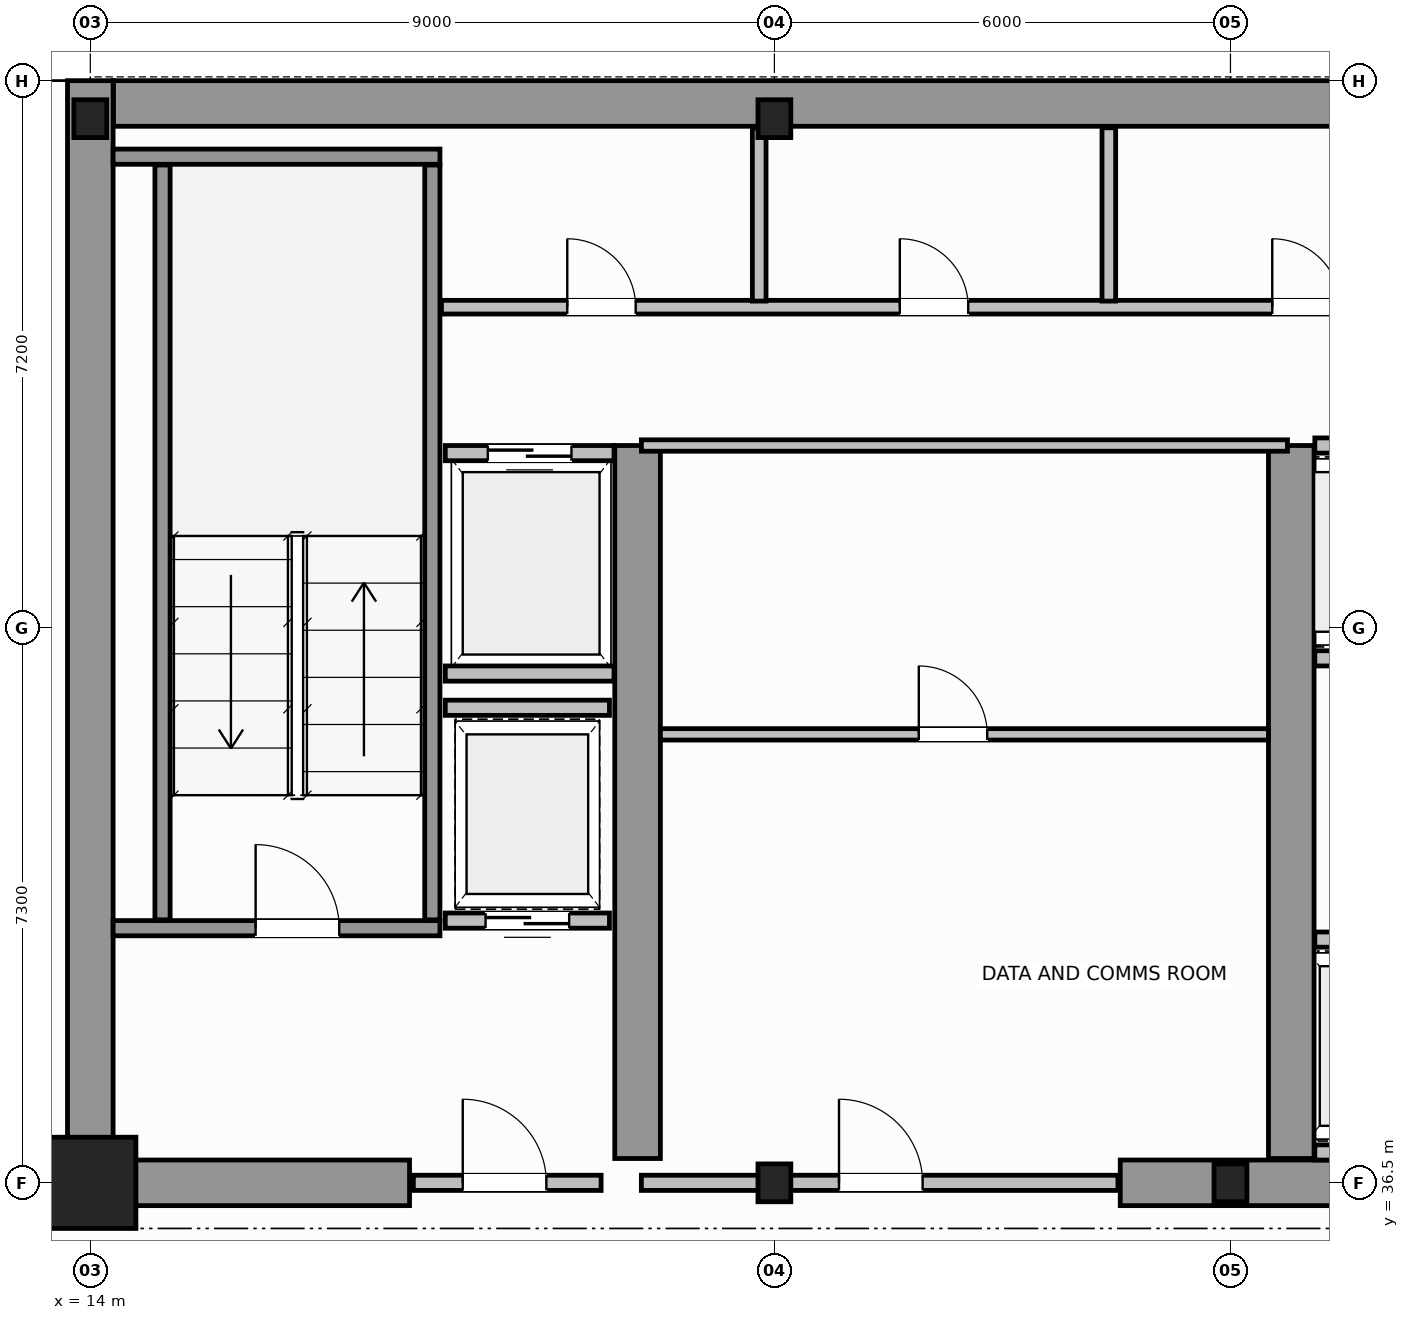
"""IFC4 building model, lengths in metres.
Left out: names, types, materials, properties, quantities, classifications, styles, units other than length and angle.
Written with IfcOpenShell. Run it as: python <this file> out.ifc"""

import sys

from ifc_helpers import new_model, si_unit, direction, frame, frame_2d, origin, origin_2d, place, context, subcontext, project, spatial, rectangle, i_section, extrude, source, transform, mapped, element, fill, save


model = new_model("IFC4")
c1 = context("Model", 3, precision=1e-05, world=origin(), true_north=direction((0.0, 1.0)))
c2 = subcontext(c1, "Body", "Model", "MODEL_VIEW")
j1 = project(units=[si_unit("LENGTHUNIT", "METRE"), si_unit("PLANEANGLEUNIT", "RADIAN")], contexts=[c1])
p1 = place(None, origin())
s1 = spatial("IfcSite", under=j1, at=p1, CompositionType="ELEMENT")
p2 = place(p1, origin())
s2 = spatial("IfcBuilding", under=s1, at=p2, CompositionType="ELEMENT")
p3 = place(p2, frame((0.0, 0.0, 172.8)))
s3 = spatial("IfcBuildingStorey", under=s2, at=p3, CompositionType="ELEMENT", Elevation=172.8)
m1 = source(origin(), c2, "Body", "SweptSolid", [
    extrude(rectangle(XDim=1.2, YDim=1.2, at=origin_2d()), origin(), (0.0, 0.0, 1.0), 3.8),
])
p4 = place(p3, frame((14.0, 36.5, 0.0), z_axis=(0.0, 0.0, 1.0), x_axis=(1.0, 0.0, 0.0)))
e1 = element("IfcColumn", 1, at=p4, inside=s3, PredefinedType="COLUMN", context=c2, shape_type="MappedRepresentation", body=[
    mapped(m1, transform((0.0, 0.0, 0.0), scale=1.0)),
])
m2 = source(origin(), c2, "Body", "SweptSolid", [
    extrude(i_section(OverallWidth=0.432, OverallDepth=0.498, WebThickness=0.055, FlangeThickness=0.068, FilletRadius=0.015, at=origin_2d()), origin(), (0.0, 0.0, 1.0), 3.8),
])
for number, where, z_axis, x_axis in (
    (2, (23.0, 36.5, 0.0), (0.0, 0.0, 1.0), (1.0, 0.0, 0.0)),
    (3, (29.0, 36.5, 0.0), (0.0, 0.0, 1.0), (1.0, 0.0, 0.0)),
    (4, (14.0, 50.5, 0.0), (0.0, 0.0, 1.0), (1.0, 0.0, 0.0)),
    (5, (23.0, 50.5, 0.0), (0.0, 0.0, 1.0), (1.0, 0.0, 0.0)),
):
    element("IfcColumn", number, at=place(p3, frame(where, z_axis=z_axis, x_axis=x_axis)), inside=s3, PredefinedType="COLUMN", context=c2, shape_type="MappedRepresentation", body=[
        mapped(m2, transform((0.0, 0.0, 0.0), scale=1.0)),
    ])
p5 = place(p3, frame((14.304, 50.7, 0.0), z_axis=(0.0, 0.0, 1.0), x_axis=(1.0, 0.0, 0.0)))
e6 = element("IfcWall", 6, at=p5, inside=s3, PredefinedType="SHEAR", context=c2, shape_type="SweptSolid", body=[
    extrude(rectangle(XDim=19.694, YDim=0.6, at=frame_2d((9.847, 0.0))), origin(), (0.0, 0.0, 1.0), 3.8),
])
p6 = place(p3, frame((14.0, 36.5, 0.0), z_axis=(0.0, 0.0, 1.0), x_axis=(0.0, 1.0, 0.0)))
e7 = element("IfcWall", 7, at=p6, inside=s3, PredefinedType="SHEAR", context=c2, shape_type="SweptSolid", body=[
    extrude(rectangle(XDim=14.5, YDim=0.6, at=frame_2d((7.25, 0.0))), origin(), (0.0, 0.0, 1.0), 3.8),
])
p7 = place(p3, frame((14.32, 36.5, 0.0), z_axis=(0.0, 0.0, 1.0), x_axis=(1.0, 0.0, 0.0)))
e8 = element("IfcWall", 8, at=p7, inside=s3, PredefinedType="SHEAR", context=c2, shape_type="SweptSolid", body=[
    extrude(rectangle(XDim=3.88, YDim=0.6, at=frame_2d((1.94, 0.0))), origin(), (0.0, 0.0, 1.0), 2.58),
])
p8 = place(p3, frame((27.55, 36.5, 0.0), z_axis=(0.0, 0.0, 1.0), x_axis=(1.0, 0.0, 0.0)))
e9 = element("IfcWall", 9, at=p8, inside=s3, PredefinedType="SHEAR", context=c2, shape_type="SweptSolid", body=[
    extrude(rectangle(XDim=4.5, YDim=0.6, at=frame_2d((2.25, 0.0))), origin(), (0.0, 0.0, 1.0), 3.8),
])
for number, where, z_axis, x_axis in (
    (10, (21.2, 36.82, 0.0), (0.0, 0.0, 1.0), (0.0, 1.0, 0.0)),
    (11, (29.8, 36.82, 0.0), (0.0, 0.0, 1.0), (0.0, 1.0, 0.0)),
):
    element("IfcWall", number, at=place(p3, frame(where, z_axis=z_axis, x_axis=x_axis)), inside=s3, PredefinedType="SHEAR", context=c2, shape_type="SweptSolid", body=[
        extrude(rectangle(XDim=9.38, YDim=0.6, at=frame_2d((4.69, 0.0))), origin(), (0.0, 0.0, 1.0), 3.8),
    ])
p9 = place(p3, frame((14.3, 39.85, 0.0), z_axis=(0.0, 0.0, 1.0), x_axis=(1.0, 0.0, 0.0)))
e12 = element("IfcWall", 12, at=p9, inside=s3, PredefinedType="SOLIDWALL", context=c2, shape_type="SweptSolid", body=[
    extrude(rectangle(XDim=4.3, YDim=0.2, at=frame_2d((2.15, 0.0))), origin(), (0.0, 0.0, 1.0), 3.8),
])
p10 = place(p9, frame((1.875, 0.0, 0.0)))
e13 = element("IfcOpeningElement", 13, at=p10, cuts=e12, PredefinedType="OPENING", context=c2, shape_type="SweptSolid", body=[
    extrude(rectangle(XDim=1.1, YDim=2.15, at=frame_2d((0.55, 1.075))), frame((0.0, 0.11, 0.0), z_axis=(0.0, -1.0, 0.0), x_axis=(1.0, 0.0, 0.0)), (0.0, 0.0, 1.0), 0.22),
])
p11 = place(p3, frame((14.3, 50.0, 0.0), z_axis=(0.0, 0.0, 1.0), x_axis=(1.0, 0.0, 0.0)))
e14 = element("IfcWall", 14, at=p11, inside=s3, PredefinedType="SOLIDWALL", context=c2, shape_type="SweptSolid", body=[
    extrude(rectangle(XDim=4.3, YDim=0.2, at=frame_2d((2.15, 0.0))), origin(), (0.0, 0.0, 1.0), 3.8),
])
for number, where, z_axis, x_axis in (
    (15, (14.95, 39.96, 0.0), (0.0, 0.0, 1.0), (0.0, 1.0, 0.0)),
    (16, (18.5, 39.96, 0.0), (0.0, 0.0, 1.0), (0.0, 1.0, 0.0)),
):
    element("IfcWall", number, at=place(p3, frame(where, z_axis=z_axis, x_axis=x_axis)), inside=s3, PredefinedType="SOLIDWALL", context=c2, shape_type="SweptSolid", body=[
        extrude(rectangle(XDim=9.93, YDim=0.2, at=frame_2d((4.965, 0.0))), origin(), (0.0, 0.0, 1.0), 3.8),
    ])
p12 = place(p3, frame((18.25, 36.5, 0.0), z_axis=(0.0, 0.0, 1.0), x_axis=(1.0, 0.0, 0.0)))
e17 = element("IfcWall", 17, at=p12, inside=s3, PredefinedType="SOLIDWALL", context=c2, shape_type="SweptSolid", body=[
    extrude(rectangle(XDim=2.47, YDim=0.2, at=frame_2d((1.235, 0.0))), origin(), (0.0, 0.0, 1.0), 2.57),
])
p13 = place(p12, frame((0.65, 0.0, 0.0)))
e18 = element("IfcOpeningElement", 18, at=p13, cuts=e17, PredefinedType="OPENING", context=c2, shape_type="SweptSolid", body=[
    extrude(rectangle(XDim=1.1, YDim=2.15, at=frame_2d((0.55, 1.075))), frame((0.0, 0.11, 0.0), z_axis=(0.0, -1.0, 0.0), x_axis=(1.0, 0.0, 0.0)), (0.0, 0.0, 1.0), 0.22),
])
p14 = place(p3, frame((30.11, 39.7, 0.0), z_axis=(0.0, 0.0, 1.0), x_axis=(1.0, 0.0, 0.0)))
e19 = element("IfcWall", 19, at=p14, inside=s3, PredefinedType="SOLIDWALL", context=c2, shape_type="SweptSolid", body=[
    extrude(rectangle(XDim=1.92, YDim=0.2, at=frame_2d((0.96, 0.0))), origin(), (0.0, 0.0, 1.0), 3.58),
])
p15 = place(p14, frame((0.41, 0.0, 0.0)))
e20 = element("IfcOpeningElement", 20, at=p15, cuts=e19, PredefinedType="OPENING", context=c2, shape_type="SweptSolid", body=[
    extrude(rectangle(XDim=1.1, YDim=2.15, at=frame_2d((0.55, 1.075))), frame((0.0, 0.11, 0.0), z_axis=(0.0, -1.0, 0.0), x_axis=(1.0, 0.0, 0.0)), (0.0, 0.0, 1.0), 0.22),
])
p16 = place(p3, frame((30.11, 36.9, 0.0), z_axis=(0.0, 0.0, 1.0), x_axis=(1.0, 0.0, 0.0)))
e21 = element("IfcWall", 21, at=p16, inside=s3, PredefinedType="SOLIDWALL", context=c2, shape_type="SweptSolid", body=[
    extrude(rectangle(XDim=1.92, YDim=0.2, at=frame_2d((0.96, 0.0))), origin(), (0.0, 0.0, 1.0), 3.58),
])
p17 = place(p3, frame((30.11, 43.4, 0.0), z_axis=(0.0, 0.0, 1.0), x_axis=(1.0, 0.0, 0.0)))
e22 = element("IfcWall", 22, at=p17, inside=s3, PredefinedType="SOLIDWALL", context=c2, shape_type="SweptSolid", body=[
    extrude(rectangle(XDim=1.8, YDim=0.2, at=frame_2d((0.9, 0.0))), origin(), (0.0, 0.0, 1.0), 3.58),
])
p18 = place(p17, frame((0.35, 0.0, 0.0)))
e23 = element("IfcOpeningElement", 23, at=p18, cuts=e22, PredefinedType="OPENING", context=c2, shape_type="SweptSolid", body=[
    extrude(rectangle(XDim=1.1, YDim=2.15, at=frame_2d((0.55, 1.075))), frame((0.0, 0.11, 0.0), z_axis=(0.0, -1.0, 0.0), x_axis=(1.0, 0.0, 0.0)), (0.0, 0.0, 1.0), 0.22),
])
p19 = place(p3, frame((30.11, 46.2, 0.0), z_axis=(0.0, 0.0, 1.0), x_axis=(1.0, 0.0, 0.0)))
e24 = element("IfcWall", 24, at=p19, inside=s3, PredefinedType="SOLIDWALL", context=c2, shape_type="SweptSolid", body=[
    extrude(rectangle(XDim=1.8, YDim=0.2, at=frame_2d((0.9, 0.0))), origin(), (0.0, 0.0, 1.0), 3.58),
])
p20 = place(p3, frame((18.67, 46.1, 0.0), z_axis=(0.0, 0.0, 1.0), x_axis=(1.0, 0.0, 0.0)))
e25 = element("IfcWall", 25, at=p20, inside=s3, PredefinedType="SOLIDWALL", context=c2, shape_type="SweptSolid", body=[
    extrude(rectangle(XDim=2.22, YDim=0.2, at=frame_2d((1.11, 0.0))), origin(), (0.0, 0.0, 1.0), 3.58),
])
p21 = place(p20, frame((0.56, 0.0, 0.0)))
e26 = element("IfcOpeningElement", 26, at=p21, cuts=e25, PredefinedType="OPENING", context=c2, shape_type="SweptSolid", body=[
    extrude(rectangle(XDim=1.1, YDim=2.15, at=frame_2d((0.55, 1.075))), frame((0.0, 0.11, 0.0), z_axis=(0.0, -1.0, 0.0), x_axis=(1.0, 0.0, 0.0)), (0.0, 0.0, 1.0), 0.22),
])
p22 = place(p3, frame((18.67, 43.2, 0.0), z_axis=(0.0, 0.0, 1.0), x_axis=(1.0, 0.0, 0.0)))
e27 = element("IfcWall", 27, at=p22, inside=s3, PredefinedType="SOLIDWALL", context=c2, shape_type="SweptSolid", body=[
    extrude(rectangle(XDim=2.22, YDim=0.2, at=frame_2d((1.11, 0.0))), origin(), (0.0, 0.0, 1.0), 3.58),
])
p23 = place(p3, frame((18.67, 39.95, 0.0), z_axis=(0.0, 0.0, 1.0), x_axis=(1.0, 0.0, 0.0)))
e28 = element("IfcWall", 28, at=p23, inside=s3, PredefinedType="SOLIDWALL", context=c2, shape_type="SweptSolid", body=[
    extrude(rectangle(XDim=2.16, YDim=0.2, at=frame_2d((1.08, 0.0))), origin(), (0.0, 0.0, 1.0), 3.58),
])
p24 = place(p23, frame((0.53, 0.0, 0.0)))
e29 = element("IfcOpeningElement", 29, at=p24, cuts=e28, PredefinedType="OPENING", context=c2, shape_type="SweptSolid", body=[
    extrude(rectangle(XDim=1.1, YDim=2.15, at=frame_2d((0.55, 1.075))), frame((0.0, 0.11, 0.0), z_axis=(0.0, -1.0, 0.0), x_axis=(1.0, 0.0, 0.0)), (0.0, 0.0, 1.0), 0.22),
])
p25 = place(p3, frame((18.67, 42.75, 0.0), z_axis=(0.0, 0.0, 1.0), x_axis=(1.0, 0.0, 0.0)))
e30 = element("IfcWall", 30, at=p25, inside=s3, PredefinedType="SOLIDWALL", context=c2, shape_type="SweptSolid", body=[
    extrude(rectangle(XDim=2.16, YDim=0.2, at=frame_2d((1.08, 0.0))), origin(), (0.0, 0.0, 1.0), 3.58),
])
p26 = place(p3, frame((21.25, 36.5, 0.0), z_axis=(0.0, 0.0, 1.0), x_axis=(1.0, 0.0, 0.0)))
e31 = element("IfcWall", 31, at=p26, inside=s3, PredefinedType="SOLIDWALL", context=c2, shape_type="SweptSolid", body=[
    extrude(rectangle(XDim=6.27, YDim=0.2, at=frame_2d((3.135, 0.0))), origin(), (0.0, 0.0, 1.0), 2.57),
])
p27 = place(p26, frame((2.6, 0.0, 0.0)))
e32 = element("IfcOpeningElement", 32, at=p27, cuts=e31, PredefinedType="OPENING", context=c2, shape_type="SweptSolid", body=[
    extrude(rectangle(XDim=1.1, YDim=2.15, at=frame_2d((0.55, 1.075))), frame((0.0, 0.11, 0.0), z_axis=(0.0, -1.0, 0.0), x_axis=(1.0, 0.0, 0.0)), (0.0, 0.0, 1.0), 0.22),
])
p28 = place(p3, frame((21.25, 46.2, 0.0), z_axis=(0.0, 0.0, 1.0), x_axis=(1.0, 0.0, 0.0)))
e33 = element("IfcWall", 33, at=p28, inside=s3, PredefinedType="PARTITIONING", context=c2, shape_type="SweptSolid", body=[
    extrude(rectangle(XDim=8.5, YDim=0.15, at=frame_2d((4.25, 0.0))), origin(), (0.0, 0.0, 1.0), 3.58),
])
p29 = place(p3, frame((21.5, 42.4, 0.0), z_axis=(0.0, 0.0, 1.0), x_axis=(1.0, 0.0, 0.0)))
e34 = element("IfcWall", 34, at=p29, inside=s3, PredefinedType="PARTITIONING", context=c2, shape_type="SweptSolid", body=[
    extrude(rectangle(XDim=8.0, YDim=0.15, at=frame_2d((4.0, 0.0))), origin(), (0.0, 0.0, 1.0), 3.58),
])
p30 = place(p29, frame((3.4, 0.0, 0.0)))
e35 = element("IfcOpeningElement", 35, at=p30, cuts=e34, PredefinedType="OPENING", context=c2, shape_type="SweptSolid", body=[
    extrude(rectangle(XDim=0.9, YDim=2.1, at=frame_2d((0.45, 1.05))), frame((0.0, 0.085, 0.0), z_axis=(0.0, -1.0, 0.0), x_axis=(1.0, 0.0, 0.0)), (0.0, 0.0, 1.0), 0.17),
])
p31 = place(p3, frame((18.62, 48.02, 0.0), z_axis=(0.0, 0.0, 1.0), x_axis=(1.0, 0.0, 0.0)))
e36 = element("IfcWall", 36, at=p31, inside=s3, PredefinedType="PLUMBINGWALL", context=c2, shape_type="SweptSolid", body=[
    extrude(rectangle(XDim=30.76, YDim=0.18, at=frame_2d((15.38, 0.0))), origin(), (0.0, 0.0, 1.0), 3.58),
])
p32 = place(p31, frame((1.655, 0.0, 0.0)))
e37 = element("IfcOpeningElement", 37, at=p32, cuts=e36, PredefinedType="OPENING", context=c2, shape_type="SweptSolid", body=[
    extrude(rectangle(XDim=0.9, YDim=2.15, at=frame_2d((0.45, 1.075))), frame((0.0, 0.1, 0.0), z_axis=(0.0, -1.0, 0.0), x_axis=(1.0, 0.0, 0.0)), (0.0, 0.0, 1.0), 0.2),
])
p33 = place(p31, frame((6.03, 0.0, 0.0)))
e38 = element("IfcOpeningElement", 38, at=p33, cuts=e36, PredefinedType="OPENING", context=c2, shape_type="SweptSolid", body=[
    extrude(rectangle(XDim=0.9, YDim=2.15, at=frame_2d((0.45, 1.075))), frame((0.0, 0.1, 0.0), z_axis=(0.0, -1.0, 0.0), x_axis=(1.0, 0.0, 0.0)), (0.0, 0.0, 1.0), 0.2),
])
p34 = place(p31, frame((10.93, 0.0, 0.0)))
e39 = element("IfcOpeningElement", 39, at=p34, cuts=e36, PredefinedType="OPENING", context=c2, shape_type="SweptSolid", body=[
    extrude(rectangle(XDim=0.9, YDim=2.15, at=frame_2d((0.45, 1.075))), frame((0.0, 0.1, 0.0), z_axis=(0.0, -1.0, 0.0), x_axis=(1.0, 0.0, 0.0)), (0.0, 0.0, 1.0), 0.2),
])
p35 = place(p31, frame((16.13, 0.0, 0.0)))
e40 = element("IfcOpeningElement", 40, at=p35, cuts=e36, PredefinedType="OPENING", context=c2, shape_type="SweptSolid", body=[
    extrude(rectangle(XDim=0.9, YDim=2.15, at=frame_2d((0.45, 1.075))), frame((0.0, 0.1, 0.0), z_axis=(0.0, -1.0, 0.0), x_axis=(1.0, 0.0, 0.0)), (0.0, 0.0, 1.0), 0.2),
])
p36 = place(p31, frame((21.73, 0.0, 0.0)))
e41 = element("IfcOpeningElement", 41, at=p36, cuts=e36, PredefinedType="OPENING", context=c2, shape_type="SweptSolid", body=[
    extrude(rectangle(XDim=0.9, YDim=2.15, at=frame_2d((0.45, 1.075))), frame((0.0, 0.1, 0.0), z_axis=(0.0, -1.0, 0.0), x_axis=(1.0, 0.0, 0.0)), (0.0, 0.0, 1.0), 0.2),
])
p37 = place(p31, frame((27.505, 0.0, 0.0)))
e42 = element("IfcOpeningElement", 42, at=p37, cuts=e36, PredefinedType="OPENING", context=c2, shape_type="SweptSolid", body=[
    extrude(rectangle(XDim=0.9, YDim=2.15, at=frame_2d((0.45, 1.075))), frame((0.0, 0.1, 0.0), z_axis=(0.0, -1.0, 0.0), x_axis=(1.0, 0.0, 0.0)), (0.0, 0.0, 1.0), 0.2),
])
p38 = place(p3, frame((22.8, 48.1, 0.0), z_axis=(0.0, 0.0, 1.0), x_axis=(0.0, 1.0, 0.0)))
e43 = element("IfcWall", 43, at=p38, inside=s3, PredefinedType="PLUMBINGWALL", context=c2, shape_type="SweptSolid", body=[
    extrude(rectangle(XDim=2.28, YDim=0.18, at=frame_2d((1.14, 0.0))), origin(), (0.0, 0.0, 1.0), 2.97),
])
p39 = place(p3, frame((27.4, 48.1, 0.0), z_axis=(0.0, 0.0, 1.0), x_axis=(0.0, 1.0, 0.0)))
e44 = element("IfcWall", 44, at=p39, inside=s3, PredefinedType="PLUMBINGWALL", context=c2, shape_type="SweptSolid", body=[
    extrude(rectangle(XDim=2.28, YDim=0.18, at=frame_2d((1.14, 0.0))), origin(), (0.0, 0.0, 1.0), 3.58),
])
p40 = place(p3, frame((7.274, 36.48, 0.0), z_axis=(0.0, 0.0, 1.0), x_axis=(1.0, 0.0, 0.0)))
e45 = element("IfcWall", 45, at=p40, inside=s3, PredefinedType="PARTITIONING", context=c2, shape_type="SweptSolid", body=[
    extrude(rectangle(XDim=6.666, YDim=0.12, at=frame_2d((3.333, 0.0))), origin(), (0.0, 0.0, 1.0), 2.97),
])
p41 = place(p40, frame((2.883, 0.0, 0.0)))
e46 = element("IfcOpeningElement", 46, at=p41, cuts=e45, PredefinedType="OPENING", context=c2, shape_type="SweptSolid", body=[
    extrude(rectangle(XDim=0.9, YDim=2.15, at=frame_2d((0.45, 1.075))), frame((0.0, 0.07, 0.0), z_axis=(0.0, -1.0, 0.0), x_axis=(1.0, 0.0, 0.0)), (0.0, 0.0, 1.0), 0.14),
])
m3 = source(origin(), c2, "Body", "SweptSolid", [
    extrude(rectangle(XDim=1.1, YDim=2.15, at=frame_2d((0.55, 1.075))), frame((0.0, 0.025, 0.0), z_axis=(0.0, -1.0, 0.0), x_axis=(1.0, 0.0, 0.0)), (0.0, 0.0, 1.0), 0.05),
])
p42 = place(p10, origin())
e47 = element("IfcDoor", 47, at=p42, inside=s3, OperationType="SINGLE_SWING_LEFT", PredefinedType="DOOR", context=c2, shape_type="MappedRepresentation", body=[
    mapped(m3, transform((0.0, 0.0, 0.0), scale=1.0)),
])
fill(e13, e47)
p43 = place(p13, origin())
e48 = element("IfcDoor", 48, at=p43, inside=s3, OperationType="SINGLE_SWING_RIGHT", PredefinedType="DOOR", context=c2, shape_type="MappedRepresentation", body=[
    mapped(m3, transform((0.0, 0.0, 0.0), scale=1.0)),
])
fill(e18, e48)
p44 = place(p21, origin())
e49 = element("IfcDoor", 49, at=p44, inside=s3, OperationType="DOUBLE_DOOR_SLIDING", PredefinedType="DOOR", context=c2, shape_type="MappedRepresentation", body=[
    mapped(m3, transform((0.0, 0.0, 0.0), scale=1.0)),
])
fill(e26, e49)
p45 = place(p24, origin())
e50 = element("IfcDoor", 50, at=p45, inside=s3, OperationType="DOUBLE_DOOR_SLIDING", PredefinedType="DOOR", context=c2, shape_type="MappedRepresentation", body=[
    mapped(m3, transform((0.0, 0.0, 0.0), scale=1.0)),
])
fill(e29, e50)
p46 = place(p27, origin())
e51 = element("IfcDoor", 51, at=p46, inside=s3, OperationType="SINGLE_SWING_LEFT", PredefinedType="DOOR", context=c2, shape_type="MappedRepresentation", body=[
    mapped(m3, transform((0.0, 0.0, 0.0), scale=1.0)),
])
fill(e32, e51)
m4 = source(origin(), c2, "Body", "SweptSolid", [
    extrude(rectangle(XDim=0.9, YDim=2.1, at=frame_2d((0.45, 1.05))), frame((0.0, 0.025, 0.0), z_axis=(0.0, -1.0, 0.0), x_axis=(1.0, 0.0, 0.0)), (0.0, 0.0, 1.0), 0.05),
])
p47 = place(p30, origin())
e52 = element("IfcDoor", 52, at=p47, inside=s3, OperationType="SINGLE_SWING_RIGHT", PredefinedType="DOOR", context=c2, shape_type="MappedRepresentation", body=[
    mapped(m4, transform((0.0, 0.0, 0.0), scale=1.0)),
])
fill(e35, e52)
m5 = source(origin(), c2, "Body", "SweptSolid", [
    extrude(rectangle(XDim=0.9, YDim=2.15, at=frame_2d((0.45, 1.075))), frame((0.0, 0.025, 0.0), z_axis=(0.0, -1.0, 0.0), x_axis=(1.0, 0.0, 0.0)), (0.0, 0.0, 1.0), 0.05),
])
p48 = place(p32, origin())
e53 = element("IfcDoor", 53, at=p48, inside=s3, OperationType="SINGLE_SWING_LEFT", PredefinedType="DOOR", context=c2, shape_type="MappedRepresentation", body=[
    mapped(m5, transform((0.0, 0.0, 0.0), scale=1.0)),
])
fill(e37, e53)
p49 = place(p33, origin())
e54 = element("IfcDoor", 54, at=p49, inside=s3, OperationType="SINGLE_SWING_RIGHT", PredefinedType="DOOR", context=c2, shape_type="MappedRepresentation", body=[
    mapped(m5, transform((0.0, 0.0, 0.0), scale=1.0)),
])
fill(e38, e54)
p50 = place(p34, origin())
e55 = element("IfcDoor", 55, at=p50, inside=s3, OperationType="SINGLE_SWING_LEFT", PredefinedType="DOOR", context=c2, shape_type="MappedRepresentation", body=[
    mapped(m5, transform((0.0, 0.0, 0.0), scale=1.0)),
])
fill(e39, e55)
save(model, sys.argv[1])
